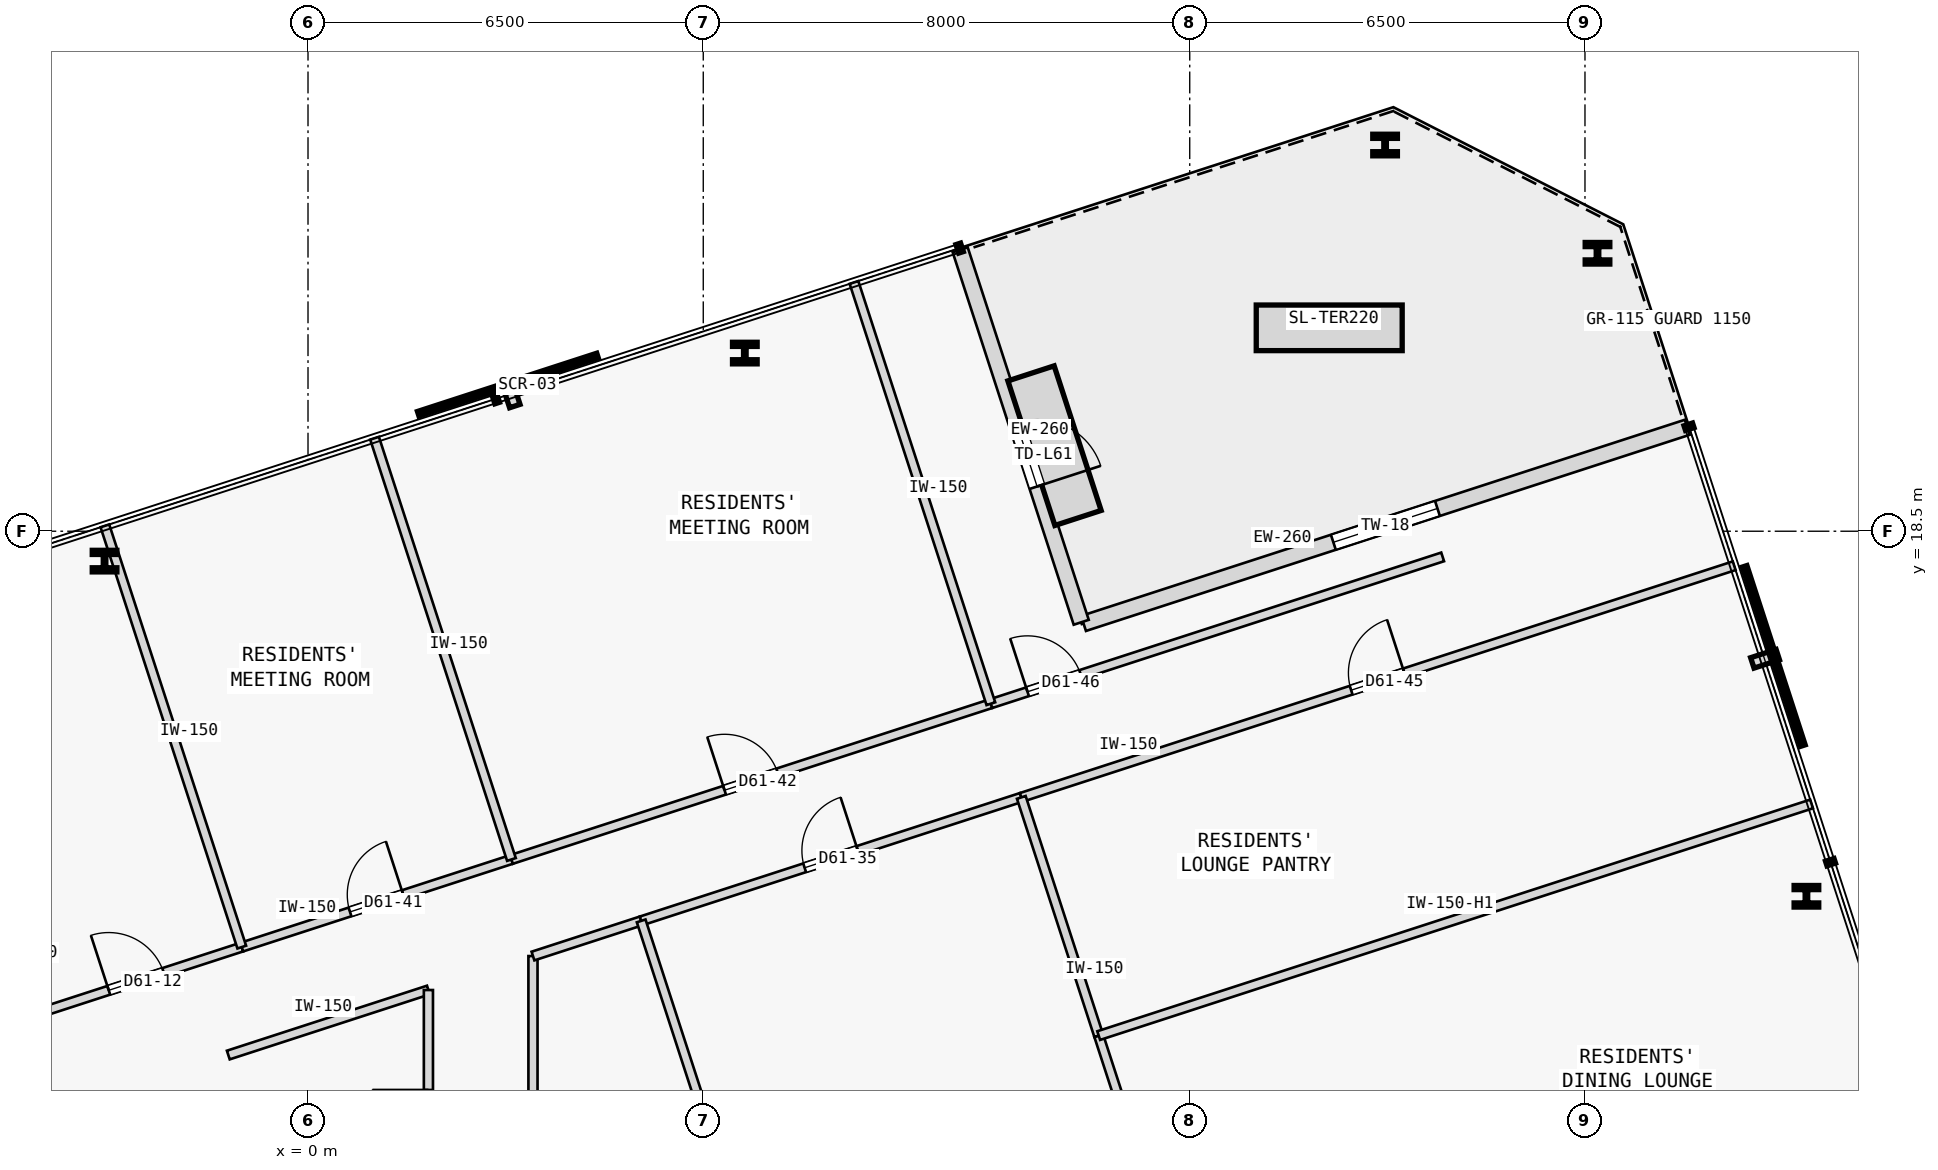
"""IFC4 building model, lengths in metres.
Left out: names, types, materials, properties, quantities, classifications, styles, units other than length and angle.
Written with IfcOpenShell. Run it as: python <this file> out.ifc"""

import sys

from ifc_helpers import new_model, si_unit, direction, frame, frame_2d, origin, origin_2d, place, context, subcontext, project, spatial, rectangle, i_section, extrude, element, fill, save


model = new_model("IFC4")
c1 = context("Model", 3, precision=1e-05, world=origin(), true_north=direction((0.0, 1.0)))
c2 = subcontext(c1, "Body", "Model", "MODEL_VIEW")
j1 = project(units=[si_unit("LENGTHUNIT", "METRE"), si_unit("PLANEANGLEUNIT", "RADIAN")], contexts=[c1])
p1 = place(None, origin())
s1 = spatial("IfcSite", under=j1, at=p1, CompositionType="ELEMENT")
p2 = place(p1, origin())
s2 = spatial("IfcBuilding", under=s1, at=p2, CompositionType="ELEMENT")
p3 = place(p2, frame((0.0, 0.0, 231.0)))
s3 = spatial("IfcBuildingStorey", under=s2, at=p3, CompositionType="ELEMENT", Elevation=231.0)
for number, where, z_axis, x_axis in (
    (1, (24.642, 12.497, 0.0), (0.0, 0.0, 1.0), (1.0, 0.0, 0.0)),
    (2, (21.206, 23.071, 0.0), (0.0, 0.0, 1.0), (1.0, 0.0, 0.0)),
    (3, (17.713, 24.851, 0.0), (0.0, 0.0, 1.0), (1.0, 0.0, 0.0)),
    (4, (7.184, 21.43, 0.0), (0.0, 0.0, 1.0), (1.0, 0.0, 0.0)),
    (5, (-3.346, 18.009, 0.0), (0.0, 0.0, 1.0), (1.0, 0.0, 0.0)),
):
    element("IfcColumn", number, at=place(p3, frame(where, z_axis=z_axis, x_axis=x_axis)), inside=s3, PredefinedType="COLUMN", context=c2, shape_type="SweptSolid", body=[
        extrude(i_section(OverallWidth=0.405, OverallDepth=0.355, WebThickness=0.042, FlangeThickness=0.068, FilletRadius=0.015, at=origin_2d()), origin(), (0.0, 0.0, 1.0), 3.35),
    ])
p4 = place(p3, frame((22.683, 20.209, 0.0), z_axis=(0.0, 0.0, 1.0), x_axis=(-0.951059842903, -0.309006755941, 0.0)))
e6 = element("IfcWall", 6, at=p4, inside=s3, PredefinedType="STANDARD", context=c2, shape_type="SweptSolid", body=[
    extrude(rectangle(XDim=10.44, YDim=0.26, at=frame_2d((5.22, 0.0))), origin(), (0.0, 0.0, 1.0), 3.125),
])
p5 = place(p4, frame((4.32, 0.0, 0.8)))
e7 = element("IfcOpeningElement", 7, at=p5, cuts=e6, PredefinedType="OPENING", context=c2, shape_type="SweptSolid", body=[
    extrude(rectangle(XDim=1.8, YDim=1.8, at=frame_2d((0.9, 0.9))), frame((0.0, 0.14, 0.0), z_axis=(0.0, -1.0, 0.0), x_axis=(1.0, 0.0, 0.0)), (0.0, 0.0, 1.0), 0.28),
])
p6 = place(p3, frame((12.716, 17.003, 0.0), z_axis=(0.0, 0.0, 1.0), x_axis=(-0.309008064496, 0.951059417742, 0.0)))
e8 = element("IfcWall", 8, at=p6, inside=s3, PredefinedType="STANDARD", context=c2, shape_type="SweptSolid", body=[
    extrude(rectangle(XDim=6.44, YDim=0.26, at=frame_2d((3.22, 0.0))), origin(), (0.0, 0.0, 1.0), 3.125),
])
p7 = place(p6, frame((2.348, 0.0, 0.0)))
e9 = element("IfcOpeningElement", 9, at=p7, cuts=e8, PredefinedType="OPENING", context=c2, shape_type="SweptSolid", body=[
    extrude(rectangle(XDim=1.1, YDim=2.2, at=frame_2d((0.55, 1.1))), frame((0.0, 0.14, 0.0), z_axis=(0.0, -1.0, 0.0), x_axis=(1.0, 0.0, 0.0)), (0.0, 0.0, 1.0), 0.28),
])
p8 = place(p3, frame((-4.561, 10.533, 0.0), z_axis=(0.0, 0.0, 1.0), x_axis=(0.951057168147, 0.309014988174, 0.0)))
e10 = element("IfcWall", 10, at=p8, inside=s3, PredefinedType="PARTITIONING", context=c2, shape_type="SweptSolid", body=[
    extrude(rectangle(XDim=3.65, YDim=0.15, at=frame_2d((1.825, 0.0))), origin(), (0.0, 0.0, 1.0), 3.125),
])
p9 = place(p8, frame((1.35, 0.0, 0.0)))
e11 = element("IfcOpeningElement", 11, at=p9, cuts=e10, PredefinedType="OPENING", context=c2, shape_type="SweptSolid", body=[
    extrude(rectangle(XDim=0.95, YDim=2.15, at=frame_2d((0.475, 1.075))), frame((0.0, 0.085, 0.0), z_axis=(0.0, -1.0, 0.0), x_axis=(1.0, 0.0, 0.0)), (0.0, 0.0, 1.0), 0.17),
])
p10 = place(p3, frame((3.7, 5.6, 0.0), z_axis=(0.0, 0.0, 1.0), x_axis=(-0.000123839008, 0.999999992332, 0.0)))
e12 = element("IfcWall", 12, at=p10, inside=s3, PredefinedType="PARTITIONING", context=c2, shape_type="SweptSolid", body=[
    extrude(rectangle(XDim=5.914, YDim=0.15, at=frame_2d((2.957, 0.0))), origin(), (0.0, 0.0, 1.0), 2.675),
])
p11 = place(p10, frame((2.497, 0.0, 0.0)))
e13 = element("IfcOpeningElement", 13, at=p11, cuts=e12, PredefinedType="OPENING", context=c2, shape_type="SweptSolid", body=[
    extrude(rectangle(XDim=0.92, YDim=2.15, at=frame_2d((0.46, 1.075))), frame((0.0, 0.085, 0.0), z_axis=(0.0, -1.0, 0.0), x_axis=(1.0, 0.0, 0.0)), (0.0, 0.0, 1.0), 0.17),
])
p12 = place(p3, frame((3.699, 11.514, 0.0), z_axis=(0.0, 0.0, 1.0), x_axis=(0.951069540665, 0.308976906612, 0.0)))
e14 = element("IfcWall", 14, at=p12, inside=s3, PredefinedType="PARTITIONING", context=c2, shape_type="SweptSolid", body=[
    extrude(rectangle(XDim=1.871, YDim=0.15, at=frame_2d((0.936, 0.0))), origin(), (0.0, 0.0, 1.0), 3.125),
])
p13 = place(p3, frame((5.479, 12.092, 0.0), z_axis=(0.0, 0.0, 1.0), x_axis=(0.951051809397, 0.309031480343, 0.0)))
e15 = element("IfcWall", 15, at=p13, inside=s3, PredefinedType="PARTITIONING", context=c2, shape_type="SweptSolid", body=[
    extrude(rectangle(XDim=6.573, YDim=0.15, at=frame_2d((3.287, 0.0))), origin(), (0.0, 0.0, 1.0), 3.125),
])
p14 = place(p13, frame((2.826, 0.0, 0.0)))
e16 = element("IfcOpeningElement", 16, at=p14, cuts=e15, PredefinedType="OPENING", context=c2, shape_type="SweptSolid", body=[
    extrude(rectangle(XDim=0.92, YDim=2.15, at=frame_2d((0.46, 1.075))), frame((0.0, 0.085, 0.0), z_axis=(0.0, -1.0, 0.0), x_axis=(1.0, 0.0, 0.0)), (0.0, 0.0, 1.0), 0.17),
])
p15 = place(p3, frame((-1.311, 9.886, 0.0), z_axis=(0.0, 0.0, 1.0), x_axis=(0.951068803905, 0.308979174442, 0.0)))
e17 = element("IfcWall", 17, at=p15, inside=s3, PredefinedType="PARTITIONING", context=c2, shape_type="SweptSolid", body=[
    extrude(rectangle(XDim=3.46, YDim=0.15, at=frame_2d((1.73, 0.0))), origin(), (0.0, 0.0, 1.0), 3.125),
])
p16 = place(p3, frame((1.98, 6.748, 0.0), z_axis=(0.0, 0.0, 1.0), x_axis=(0.0, 1.0, 0.0)))
e18 = element("IfcWall", 18, at=p16, inside=s3, PredefinedType="PARTITIONING", context=c2, shape_type="SweptSolid", body=[
    extrude(rectangle(XDim=4.207, YDim=0.15, at=frame_2d((2.104, 0.0))), origin(), (0.0, 0.0, 1.0), 2.675),
])
p17 = place(p16, frame((1.643, 0.0, 0.0)))
e19 = element("IfcOpeningElement", 19, at=p17, cuts=e18, PredefinedType="OPENING", context=c2, shape_type="SweptSolid", body=[
    extrude(rectangle(XDim=0.92, YDim=2.15, at=frame_2d((0.46, 1.075))), frame((0.0, 0.085, 0.0), z_axis=(0.0, -1.0, 0.0), x_axis=(1.0, 0.0, 0.0)), (0.0, 0.0, 1.0), 0.17),
])
p18 = place(p3, frame((-1.089, 11.661, 0.0), z_axis=(0.0, 0.0, 1.0), x_axis=(0.951043687064, 0.309056475901, 0.0)))
e20 = element("IfcWall", 20, at=p18, inside=s3, PredefinedType="PARTITIONING", context=c2, shape_type="SweptSolid", body=[
    extrude(rectangle(XDim=4.663, YDim=0.15, at=frame_2d((2.332, 0.0))), origin(), (0.0, 0.0, 1.0), 3.125),
])
p19 = place(p18, frame((1.872, 0.0, 0.0)))
e21 = element("IfcOpeningElement", 21, at=p19, cuts=e20, PredefinedType="OPENING", context=c2, shape_type="SweptSolid", body=[
    extrude(rectangle(XDim=0.92, YDim=2.15, at=frame_2d((0.46, 1.075))), frame((0.0, 0.085, 0.0), z_axis=(0.0, -1.0, 0.0), x_axis=(1.0, 0.0, 0.0)), (0.0, 0.0, 1.0), 0.17),
])
p20 = place(p3, frame((3.345, 13.102, 0.0), z_axis=(0.0, 0.0, 1.0), x_axis=(0.951061984224, 0.309000165314, 0.0)))
e22 = element("IfcWall", 22, at=p20, inside=s3, PredefinedType="PARTITIONING", context=c2, shape_type="SweptSolid", body=[
    extrude(rectangle(XDim=8.29, YDim=0.15, at=frame_2d((4.145, 0.0))), origin(), (0.0, 0.0, 1.0), 3.125),
])
p21 = place(p20, frame((3.685, 0.0, 0.0)))
e23 = element("IfcOpeningElement", 23, at=p21, cuts=e22, PredefinedType="OPENING", context=c2, shape_type="SweptSolid", body=[
    extrude(rectangle(XDim=0.92, YDim=2.15, at=frame_2d((0.46, 1.075))), frame((0.0, 0.085, 0.0), z_axis=(0.0, -1.0, 0.0), x_axis=(1.0, 0.0, 0.0)), (0.0, 0.0, 1.0), 0.17),
])
p22 = place(p3, frame((11.73, 14.123, 0.0), z_axis=(0.0, 0.0, 1.0), x_axis=(0.951060263663, 0.309005460926, 0.0)))
e24 = element("IfcWall", 24, at=p22, inside=s3, PredefinedType="PARTITIONING", context=c2, shape_type="SweptSolid", body=[
    extrude(rectangle(XDim=12.327, YDim=0.15, at=frame_2d((6.164, 0.0))), origin(), (0.0, 0.0, 1.0), 3.125),
])
p23 = place(p22, frame((5.704, 0.0, 0.0)))
e25 = element("IfcOpeningElement", 25, at=p23, cuts=e24, PredefinedType="OPENING", context=c2, shape_type="SweptSolid", body=[
    extrude(rectangle(XDim=0.92, YDim=2.15, at=frame_2d((0.46, 1.075))), frame((0.0, 0.085, 0.0), z_axis=(0.0, -1.0, 0.0), x_axis=(1.0, 0.0, 0.0)), (0.0, 0.0, 1.0), 0.17),
])
p24 = place(p3, frame((11.229, 15.664, 0.0), z_axis=(0.0, 0.0, 1.0), x_axis=(0.951056113966, 0.309018232614, 0.0)))
e26 = element("IfcWall", 26, at=p24, inside=s3, PredefinedType="PARTITIONING", context=c2, shape_type="SweptSolid", body=[
    extrude(rectangle(XDim=7.812, YDim=0.15, at=frame_2d((3.906, 0.0))), origin(), (0.0, 0.0, 1.0), 3.125),
])
p25 = place(p24, frame((0.634, 0.0, 0.0)))
e27 = element("IfcOpeningElement", 27, at=p25, cuts=e26, PredefinedType="OPENING", context=c2, shape_type="SweptSolid", body=[
    extrude(rectangle(XDim=0.92, YDim=2.15, at=frame_2d((0.46, 1.075))), frame((0.0, 0.085, 0.0), z_axis=(0.0, -1.0, 0.0), x_axis=(1.0, 0.0, 0.0)), (0.0, 0.0, 1.0), 0.17),
])
p26 = place(p3, frame((-1.089, 11.661, 0.0), z_axis=(0.0, 0.0, 1.0), x_axis=(-0.309029230739, 0.951052540372, 0.0)))
e28 = element("IfcWall", 28, at=p26, inside=s3, PredefinedType="PARTITIONING", context=c2, shape_type="SweptSolid", body=[
    extrude(rectangle(XDim=7.284, YDim=0.15, at=frame_2d((3.642, 0.0))), origin(), (0.0, 0.0, 1.0), 3.125),
])
p27 = place(p3, frame((7.588, 5.6, 0.0), z_axis=(0.0, 0.0, 1.0), x_axis=(-0.309018946982, 0.951055881852, 0.0)))
e29 = element("IfcWall", 29, at=p27, inside=s3, PredefinedType="PARTITIONING", context=c2, shape_type="SweptSolid", body=[
    extrude(rectangle(XDim=6.826, YDim=0.15, at=frame_2d((3.413, 0.0))), origin(), (0.0, 0.0, 1.0), 3.125),
])
p28 = place(p3, frame((14.5, 5.6, 0.0), z_axis=(0.0, 0.0, 1.0), x_axis=(-0.308974360462, 0.951070367837, 0.0)))
e30 = element("IfcWall", 30, at=p28, inside=s3, PredefinedType="PARTITIONING", context=c2, shape_type="SweptSolid", body=[
    extrude(rectangle(XDim=4.843, YDim=0.15, at=frame_2d((2.421, 0.0))), origin(), (0.0, 0.0, 1.0), 3.125),
])
p29 = place(p3, frame((13.003, 10.206, 0.0), z_axis=(0.0, 0.0, 1.0), x_axis=(-0.309035144366, 0.951050618814, 0.0)))
e31 = element("IfcWall", 31, at=p29, inside=s3, PredefinedType="PARTITIONING", context=c2, shape_type="SweptSolid", body=[
    extrude(rectangle(XDim=4.119, YDim=0.15, at=frame_2d((2.06, 0.0))), origin(), (0.0, 0.0, 1.0), 3.125),
])
for number, where, z_axis, x_axis in (
    (32, (3.345, 13.102, 0.0), (0.0, 0.0, 1.0), (-0.309, 0.951, 0.0)),
    (33, (11.229, 15.664, 0.0), (0.0, 0.0, 1.0), (-0.309, 0.951, 0.0)),
):
    element("IfcWall", number, at=place(p3, frame(where, z_axis=z_axis, x_axis=x_axis)), inside=s3, PredefinedType="PARTITIONING", context=c2, shape_type="SweptSolid", body=[
        extrude(rectangle(XDim=7.284, YDim=0.15, at=frame_2d((3.642, 0.0))), origin(), (0.0, 0.0, 1.0), 3.125),
    ])
p30 = place(p3, frame((13.003, 10.206, 0.0), z_axis=(0.0, 0.0, 1.0), x_axis=(0.951060263663, 0.309005460926, 0.0)))
e34 = element("IfcWall", 34, at=p30, inside=s3, PredefinedType="PARTITIONING", context=c2, shape_type="SweptSolid", body=[
    extrude(rectangle(XDim=12.327, YDim=0.15, at=frame_2d((6.164, 0.0))), origin(), (0.0, 0.0, 1.0), 2.675),
])
p31 = place(p5, origin())
e35 = element("IfcWindow", 35, at=p31, inside=s3, PartitioningType="SINGLE_PANEL", PredefinedType="WINDOW", context=c2, shape_type="SweptSolid", body=[
    extrude(rectangle(XDim=1.8, YDim=1.8, at=frame_2d((0.9, 0.9))), frame((0.0, 0.03, 0.0), z_axis=(0.0, -1.0, 0.0), x_axis=(1.0, 0.0, 0.0)), (0.0, 0.0, 1.0), 0.06),
])
fill(e7, e35)
p32 = place(p7, frame((1.1, 0.0, 0.0), z_axis=(0.0, 0.0, 1.0), x_axis=(-1.0, 0.0, 0.0)))
e36 = element("IfcDoor", 36, at=p32, inside=s3, OperationType="SINGLE_SWING_LEFT", PredefinedType="DOOR", context=c2, shape_type="SweptSolid", body=[
    extrude(rectangle(XDim=1.1, YDim=2.2, at=frame_2d((0.55, 1.1))), frame((0.0, 0.025, 0.0), z_axis=(0.0, -1.0, 0.0), x_axis=(1.0, 0.0, 0.0)), (0.0, 0.0, 1.0), 0.05),
])
fill(e9, e36)
p33 = place(p9, origin())
e37 = element("IfcDoor", 37, at=p33, inside=s3, OperationType="SINGLE_SWING_LEFT", PredefinedType="DOOR", context=c2, shape_type="SweptSolid", body=[
    extrude(rectangle(XDim=0.95, YDim=2.15, at=frame_2d((0.475, 1.075))), frame((0.0, 0.025, 0.0), z_axis=(0.0, -1.0, 0.0), x_axis=(1.0, 0.0, 0.0)), (0.0, 0.0, 1.0), 0.05),
])
fill(e11, e37)
p34 = place(p14, origin())
e38 = element("IfcDoor", 38, at=p34, inside=s3, OperationType="SINGLE_SWING_RIGHT", PredefinedType="DOOR", context=c2, shape_type="SweptSolid", body=[
    extrude(rectangle(XDim=0.92, YDim=2.15, at=frame_2d((0.46, 1.075))), frame((0.0, 0.025, 0.0), z_axis=(0.0, -1.0, 0.0), x_axis=(1.0, 0.0, 0.0)), (0.0, 0.0, 1.0), 0.05),
])
fill(e16, e38)
p35 = place(p19, origin())
e39 = element("IfcDoor", 39, at=p35, inside=s3, OperationType="SINGLE_SWING_RIGHT", PredefinedType="DOOR", context=c2, shape_type="SweptSolid", body=[
    extrude(rectangle(XDim=0.92, YDim=2.15, at=frame_2d((0.46, 1.075))), frame((0.0, 0.025, 0.0), z_axis=(0.0, -1.0, 0.0), x_axis=(1.0, 0.0, 0.0)), (0.0, 0.0, 1.0), 0.05),
])
fill(e21, e39)
p36 = place(p21, origin())
e40 = element("IfcDoor", 40, at=p36, inside=s3, OperationType="SINGLE_SWING_LEFT", PredefinedType="DOOR", context=c2, shape_type="SweptSolid", body=[
    extrude(rectangle(XDim=0.92, YDim=2.15, at=frame_2d((0.46, 1.075))), frame((0.0, 0.025, 0.0), z_axis=(0.0, -1.0, 0.0), x_axis=(1.0, 0.0, 0.0)), (0.0, 0.0, 1.0), 0.05),
])
fill(e23, e40)
p37 = place(p23, origin())
e41 = element("IfcDoor", 41, at=p37, inside=s3, OperationType="SINGLE_SWING_RIGHT", PredefinedType="DOOR", context=c2, shape_type="SweptSolid", body=[
    extrude(rectangle(XDim=0.92, YDim=2.15, at=frame_2d((0.46, 1.075))), frame((0.0, 0.025, 0.0), z_axis=(0.0, -1.0, 0.0), x_axis=(1.0, 0.0, 0.0)), (0.0, 0.0, 1.0), 0.05),
])
fill(e25, e41)
p38 = place(p25, origin())
e42 = element("IfcDoor", 42, at=p38, inside=s3, OperationType="SINGLE_SWING_LEFT", PredefinedType="DOOR", context=c2, shape_type="SweptSolid", body=[
    extrude(rectangle(XDim=0.92, YDim=2.15, at=frame_2d((0.46, 1.075))), frame((0.0, 0.025, 0.0), z_axis=(0.0, -1.0, 0.0), x_axis=(1.0, 0.0, 0.0)), (0.0, 0.0, 1.0), 0.05),
])
fill(e27, e42)
save(model, sys.argv[1])
